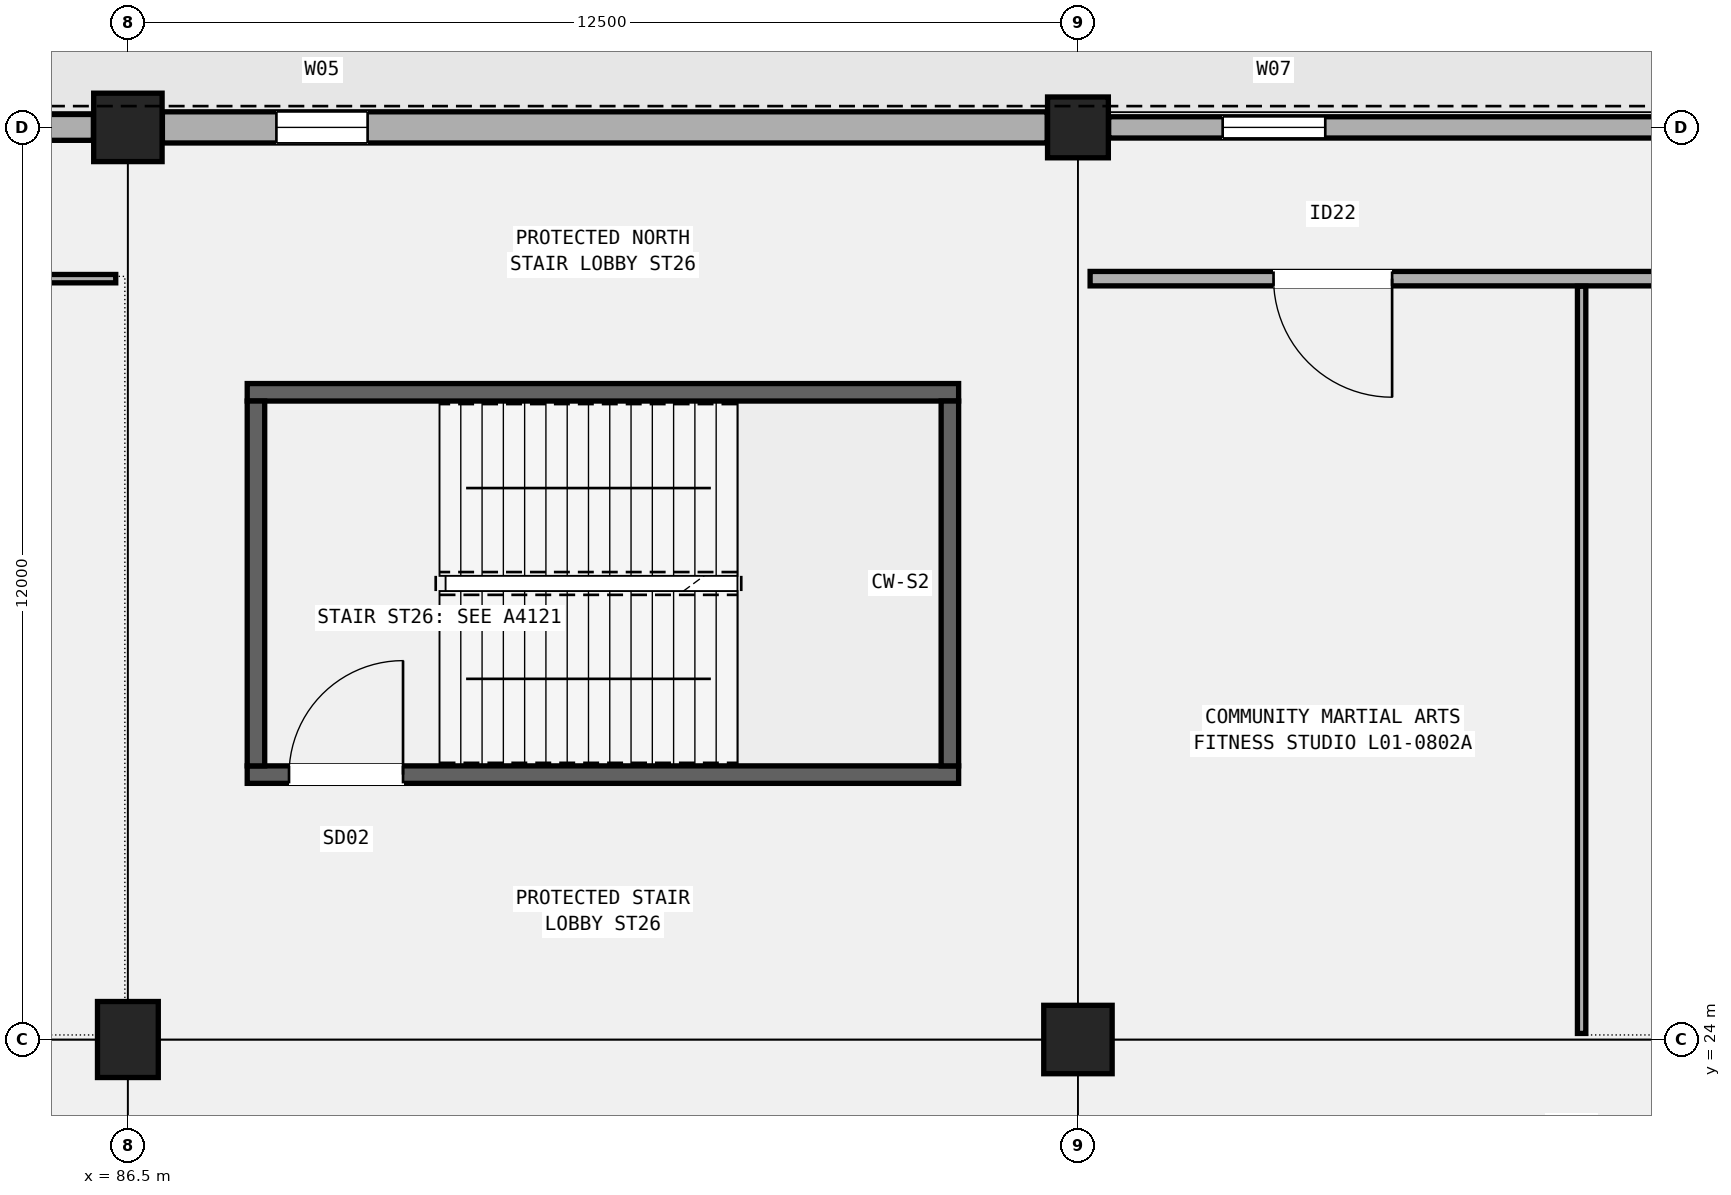
"""IFC4 building model, lengths in metres.
Left out: names, types, materials, properties, quantities, classifications, styles, units other than length and angle.
Written with IfcOpenShell. Run it as: python <this file> out.ifc"""

import sys

from ifc_helpers import new_model, si_unit, direction, frame, frame_2d, origin, origin_2d, place, context, subcontext, project, spatial, rectangle, extrude, element, fill, save


model = new_model("IFC4")
c1 = context("Model", 3, precision=1e-05, world=origin(), true_north=direction((0.0, 1.0)))
c2 = subcontext(c1, "Body", "Model", "MODEL_VIEW")
j1 = project(units=[si_unit("LENGTHUNIT", "METRE"), si_unit("PLANEANGLEUNIT", "RADIAN")], contexts=[c1])
p1 = place(None, origin())
s1 = spatial("IfcSite", under=j1, at=p1, CompositionType="ELEMENT")
p2 = place(p1, origin())
s2 = spatial("IfcBuilding", under=s1, at=p2, CompositionType="ELEMENT")
p3 = place(p2, frame((0.0, 0.0, 5.4)))
s3 = spatial("IfcBuildingStorey", under=s2, at=p3, CompositionType="ELEMENT", Elevation=5.4)
p4 = place(p3, frame((86.5, 24.0, 0.0), z_axis=(0.0, 0.0, 1.0), x_axis=(1.0, 0.0, 0.0)))
e1 = element("IfcColumn", 1, at=p4, inside=s3, PredefinedType="COLUMN", context=c2, shape_type="SweptSolid", body=[
    extrude(rectangle(XDim=0.8, YDim=1.0, at=origin_2d()), origin(), (0.0, 0.0, 1.0), 4.8),
])
for number, where, z_axis, x_axis in (
    (2, (86.5, 36.0, 0.0), (0.0, 0.0, 1.0), (1.0, 0.0, 0.0)),
    (3, (99.0, 24.0, 0.0), (0.0, 0.0, 1.0), (1.0, 0.0, 0.0)),
):
    element("IfcColumn", number, at=place(p3, frame(where, z_axis=z_axis, x_axis=x_axis)), inside=s3, PredefinedType="COLUMN", context=c2, shape_type="SweptSolid", body=[
        extrude(rectangle(XDim=0.9, YDim=0.9, at=origin_2d()), origin(), (0.0, 0.0, 1.0), 4.8),
    ])
p5 = place(p3, frame((99.0, 36.0, 0.0), z_axis=(0.0, 0.0, 1.0), x_axis=(1.0, 0.0, 0.0)))
e4 = element("IfcColumn", 4, at=p5, inside=s3, PredefinedType="COLUMN", context=c2, shape_type="SweptSolid", body=[
    extrude(rectangle(XDim=0.8, YDim=0.8, at=origin_2d()), origin(), (0.0, 0.0, 1.0), 4.8),
])
p6 = place(p3, frame((74.404, 36.0, 0.0), z_axis=(0.0, 0.0, 1.0), x_axis=(1.0, 0.0, 0.0)))
e5 = element("IfcWall", 5, at=p6, inside=s3, PredefinedType="SOLIDWALL", context=c2, shape_type="SweptSolid", body=[
    extrude(rectangle(XDim=11.642, YDim=0.34, at=frame_2d((5.821, 0.0))), origin(), (0.0, 0.0, 1.0), 4.2),
])
p7 = place(p6, frame((1.5, 0.0, 0.95)))
e6 = element("IfcOpeningElement", 6, at=p7, cuts=e5, PredefinedType="OPENING", context=c2, shape_type="SweptSolid", body=[
    extrude(rectangle(XDim=0.9, YDim=2.7, at=frame_2d((0.45, 1.35))), frame((0.0, 0.18, 0.0), z_axis=(0.0, -1.0, 0.0), x_axis=(1.0, 0.0, 0.0)), (0.0, 0.0, 1.0), 0.36),
])
p8 = place(p3, frame((86.954, 36.0, 0.0), z_axis=(0.0, 0.0, 1.0), x_axis=(1.0, 0.0, 0.0)))
e7 = element("IfcWall", 7, at=p8, inside=s3, PredefinedType="SOLIDWALL", context=c2, shape_type="SweptSolid", body=[
    extrude(rectangle(XDim=11.642, YDim=0.41, at=frame_2d((5.821, 0.0))), origin(), (0.0, 0.0, 1.0), 4.15),
])
p9 = place(p8, frame((1.5, 0.0, 0.95)))
e8 = element("IfcOpeningElement", 8, at=p9, cuts=e7, PredefinedType="OPENING", context=c2, shape_type="SweptSolid", body=[
    extrude(rectangle(XDim=1.2, YDim=1.9, at=frame_2d((0.6, 0.95))), frame((0.0, 0.215, 0.0), z_axis=(0.0, -1.0, 0.0), x_axis=(1.0, 0.0, 0.0)), (0.0, 0.0, 1.0), 0.43),
])
p10 = place(p3, frame((99.404, 36.0, 0.0), z_axis=(0.0, 0.0, 1.0), x_axis=(1.0, 0.0, 0.0)))
e9 = element("IfcWall", 9, at=p10, inside=s3, PredefinedType="SOLIDWALL", context=c2, shape_type="SweptSolid", body=[
    extrude(rectangle(XDim=12.192, YDim=0.28, at=frame_2d((6.096, 0.0))), origin(), (0.0, 0.0, 1.0), 4.2),
])
p11 = place(p10, frame((1.5, 0.0, 0.95)))
e10 = element("IfcOpeningElement", 10, at=p11, cuts=e9, PredefinedType="OPENING", context=c2, shape_type="SweptSolid", body=[
    extrude(rectangle(XDim=1.35, YDim=2.0, at=frame_2d((0.675, 1.0))), frame((0.0, 0.15, 0.0), z_axis=(0.0, -1.0, 0.0), x_axis=(1.0, 0.0, 0.0)), (0.0, 0.0, 1.0), 0.3),
])
p12 = place(p3, frame((88.07, 27.485, 0.0), z_axis=(0.0, 0.0, 1.0), x_axis=(1.0, 0.0, 0.0)))
e11 = element("IfcWall", 11, at=p12, inside=s3, PredefinedType="SHEAR", context=c2, shape_type="SweptSolid", body=[
    extrude(rectangle(XDim=9.36, YDim=0.23, at=frame_2d((4.68, 0.0))), origin(), (0.0, 0.0, 1.0), 4.55),
])
p13 = place(p12, frame((0.55, 0.0, 0.0)))
e12 = element("IfcOpeningElement", 12, at=p13, cuts=e11, PredefinedType="OPENING", context=c2, shape_type="SweptSolid", body=[
    extrude(rectangle(XDim=1.5, YDim=2.2, at=frame_2d((0.75, 1.1))), frame((0.0, 0.125, 0.0), z_axis=(0.0, -1.0, 0.0), x_axis=(1.0, 0.0, 0.0)), (0.0, 0.0, 1.0), 0.25),
])
p14 = place(p3, frame((88.07, 32.515, 0.0), z_axis=(0.0, 0.0, 1.0), x_axis=(1.0, 0.0, 0.0)))
e13 = element("IfcWall", 13, at=p14, inside=s3, PredefinedType="SHEAR", context=c2, shape_type="SweptSolid", body=[
    extrude(rectangle(XDim=9.36, YDim=0.23, at=frame_2d((4.68, 0.0))), origin(), (0.0, 0.0, 1.0), 4.55),
])
for number, where, z_axis, x_axis in (
    (14, (88.185, 27.6, 0.0), (0.0, 0.0, 1.0), (0.0, 1.0, 0.0)),
    (15, (97.315, 27.6, 0.0), (0.0, 0.0, 1.0), (0.0, 1.0, 0.0)),
):
    element("IfcWall", number, at=place(p3, frame(where, z_axis=z_axis, x_axis=x_axis)), inside=s3, PredefinedType="SHEAR", context=c2, shape_type="SweptSolid", body=[
        extrude(rectangle(XDim=4.8, YDim=0.23, at=frame_2d((2.4, 0.0))), origin(), (0.0, 0.0, 1.0), 4.55),
    ])
p15 = place(p3, frame((74.16, 34.01, 0.0), z_axis=(0.0, 0.0, 1.0), x_axis=(1.0, 0.0, 0.0)))
e16 = element("IfcWall", 16, at=p15, inside=s3, PredefinedType="PARTITIONING", context=c2, shape_type="SweptSolid", body=[
    extrude(rectangle(XDim=12.18, YDim=0.11, at=frame_2d((6.09, 0.0))), origin(), (0.0, 0.0, 1.0), 3.92),
])
p16 = place(p15, frame((6.755, 0.0, 0.0), z_axis=(0.0, 0.0, 1.0), x_axis=(-1.0, 0.0, 0.0)))
e17 = element("IfcOpeningElement", 17, at=p16, cuts=e16, PredefinedType="OPENING", context=c2, shape_type="SweptSolid", body=[
    extrude(rectangle(XDim=1.33, YDim=2.22, at=frame_2d((0.665, 1.11))), frame((0.0, 0.065, 0.0), z_axis=(0.0, -1.0, 0.0), x_axis=(1.0, 0.0, 0.0)), (0.0, 0.0, 1.0), 0.13),
])
p17 = place(p3, frame((99.16, 34.01, 0.0), z_axis=(0.0, 0.0, 1.0), x_axis=(1.0, 0.0, 0.0)))
e18 = element("IfcWall", 18, at=p17, inside=s3, PredefinedType="PARTITIONING", context=c2, shape_type="SweptSolid", body=[
    extrude(rectangle(XDim=12.68, YDim=0.19, at=frame_2d((6.34, 0.0))), origin(), (0.0, 0.0, 1.0), 3.92),
])
p18 = place(p17, frame((3.973, 0.0, 0.0), z_axis=(0.0, 0.0, 1.0), x_axis=(-1.0, 0.0, 0.0)))
e19 = element("IfcOpeningElement", 19, at=p18, cuts=e18, PredefinedType="OPENING", context=c2, shape_type="SweptSolid", body=[
    extrude(rectangle(XDim=1.56, YDim=2.26, at=frame_2d((0.78, 1.13))), frame((0.0, 0.105, 0.0), z_axis=(0.0, -1.0, 0.0), x_axis=(1.0, 0.0, 0.0)), (0.0, 0.0, 1.0), 0.21),
])
p19 = place(p17, frame((10.414, 0.0, 0.0), z_axis=(0.0, 0.0, 1.0), x_axis=(-1.0, 0.0, 0.0)))
e20 = element("IfcOpeningElement", 20, at=p19, cuts=e18, PredefinedType="OPENING", context=c2, shape_type="SweptSolid", body=[
    extrude(rectangle(XDim=1.6, YDim=2.3, at=frame_2d((0.8, 1.15))), frame((0.0, 0.105, 0.0), z_axis=(0.0, -1.0, 0.0), x_axis=(1.0, 0.0, 0.0)), (0.0, 0.0, 1.0), 0.21),
])
p20 = place(p3, frame((105.627, 24.08, 0.0), z_axis=(0.0, 0.0, 1.0), x_axis=(0.0, 1.0, 0.0)))
e21 = element("IfcWall", 21, at=p20, inside=s3, PredefinedType="PARTITIONING", context=c2, shape_type="SweptSolid", body=[
    extrude(rectangle(XDim=9.83, YDim=0.11, at=frame_2d((4.915, 0.0))), origin(), (0.0, 0.0, 1.0), 3.92),
])
p21 = place(p9, origin())
e22 = element("IfcWindow", 22, at=p21, inside=s3, PartitioningType="SINGLE_PANEL", PredefinedType="WINDOW", context=c2, shape_type="SweptSolid", body=[
    extrude(rectangle(XDim=1.2, YDim=1.9, at=frame_2d((0.6, 0.95))), frame((0.0, 0.03, 0.0), z_axis=(0.0, -1.0, 0.0), x_axis=(1.0, 0.0, 0.0)), (0.0, 0.0, 1.0), 0.06),
])
fill(e8, e22)
p22 = place(p11, origin())
e23 = element("IfcWindow", 23, at=p22, inside=s3, PartitioningType="SINGLE_PANEL", PredefinedType="WINDOW", context=c2, shape_type="SweptSolid", body=[
    extrude(rectangle(XDim=1.35, YDim=2.0, at=frame_2d((0.675, 1.0))), frame((0.0, 0.03, 0.0), z_axis=(0.0, -1.0, 0.0), x_axis=(1.0, 0.0, 0.0)), (0.0, 0.0, 1.0), 0.06),
])
fill(e10, e23)
p23 = place(p13, origin())
e24 = element("IfcDoor", 24, at=p23, inside=s3, OperationType="SINGLE_SWING_RIGHT", PredefinedType="DOOR", context=c2, shape_type="SweptSolid", body=[
    extrude(rectangle(XDim=1.5, YDim=2.2, at=frame_2d((0.75, 1.1))), frame((0.0, 0.025, 0.0), z_axis=(0.0, -1.0, 0.0), x_axis=(1.0, 0.0, 0.0)), (0.0, 0.0, 1.0), 0.05),
])
fill(e12, e24)
p24 = place(p18, origin())
e25 = element("IfcDoor", 25, at=p24, inside=s3, OperationType="SINGLE_SWING_LEFT", PredefinedType="DOOR", context=c2, shape_type="SweptSolid", body=[
    extrude(rectangle(XDim=1.56, YDim=2.26, at=frame_2d((0.78, 1.13))), frame((0.0, 0.025, 0.0), z_axis=(0.0, -1.0, 0.0), x_axis=(1.0, 0.0, 0.0)), (0.0, 0.0, 1.0), 0.05),
])
fill(e19, e25)
save(model, sys.argv[1])
